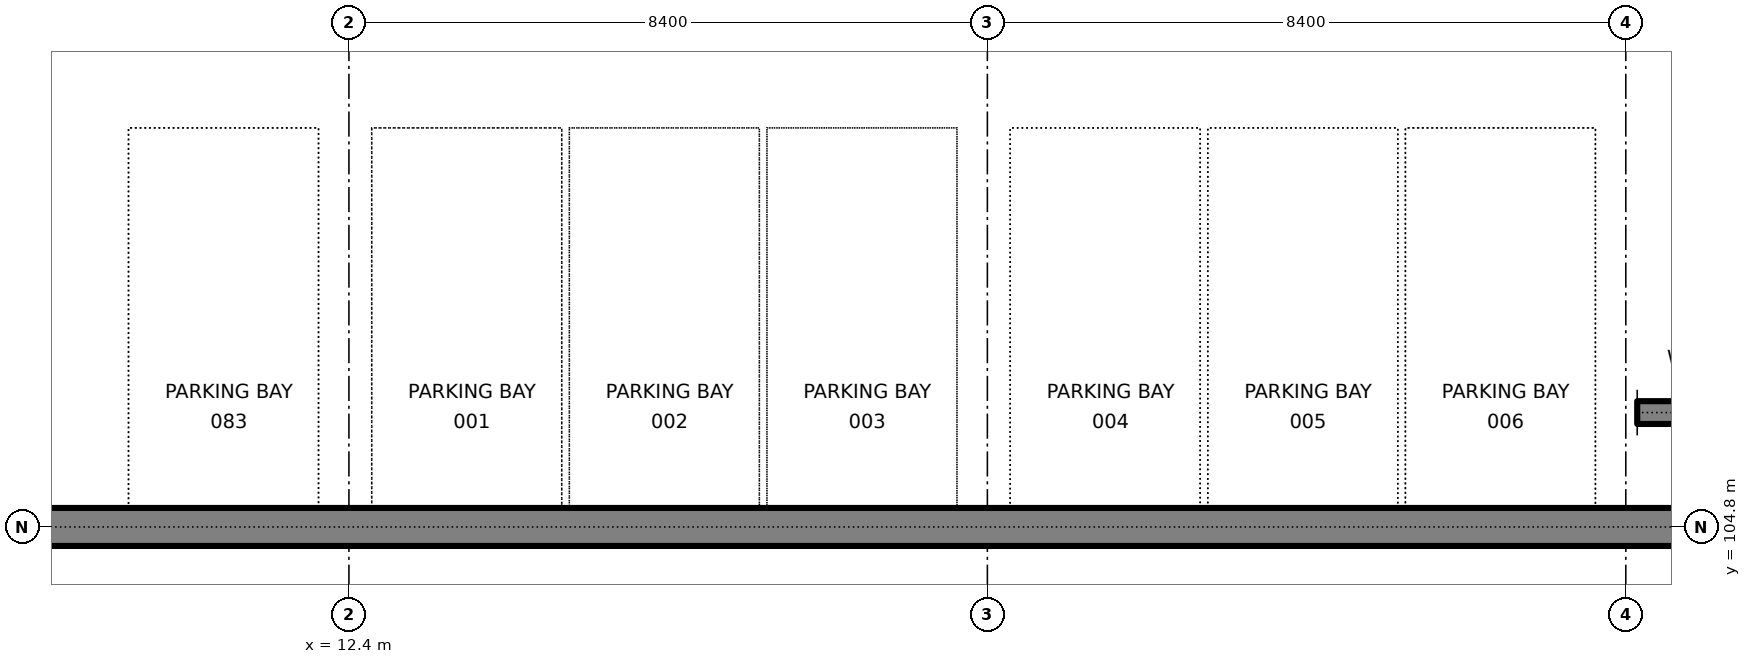
"""IFC4 building model, lengths in metres.
Left out: names, types, materials, properties, quantities, classifications, styles, units other than length and angle.
Written with IfcOpenShell. Run it as: python <this file> out.ifc"""

import sys

from ifc_helpers import new_model, si_unit, direction, frame, frame_2d, origin, place, context, subcontext, project, spatial, rectangle, extrude, element, save


model = new_model("IFC4")
c1 = context("Model", 3, precision=1e-05, world=origin(), true_north=direction((0.0, 1.0)))
c2 = subcontext(c1, "Body", "Model", "MODEL_VIEW")
j1 = project(units=[si_unit("LENGTHUNIT", "METRE"), si_unit("PLANEANGLEUNIT", "RADIAN")], contexts=[c1])
p1 = place(None, origin())
s1 = spatial("IfcSite", under=j1, at=p1, CompositionType="ELEMENT")
p2 = place(p1, origin())
s2 = spatial("IfcBuilding", under=s1, at=p2, CompositionType="ELEMENT")
p3 = place(p2, frame((0.0, 0.0, -4.6)))
s3 = spatial("IfcBuildingStorey", under=s2, at=p3, CompositionType="ELEMENT", Elevation=-4.6)
p4 = place(p3, frame((4.25, 104.8, 0.0), z_axis=(0.0, 0.0, 1.0), x_axis=(1.0, 0.0, 0.0)))
e1 = element("IfcWall", 1, at=p4, inside=s3, PredefinedType="SOLIDWALL", context=c2, shape_type="SweptSolid", body=[
    extrude(rectangle(XDim=117.1, YDim=0.5, at=frame_2d((58.55, 0.0))), origin(), (0.0, 0.0, 1.0), 4.3),
])
p5 = place(p3, frame((29.35, 106.305, 0.0), z_axis=(0.0, 0.0, 1.0), x_axis=(1.0, 0.0, 0.0)))
e2 = element("IfcWall", 2, at=p5, inside=s3, PredefinedType="SOLIDWALL", context=c2, shape_type="SweptSolid", body=[
    extrude(rectangle(XDim=3.225, YDim=0.3, at=frame_2d((1.612, 0.0))), origin(), (0.0, 0.0, 1.0), 4.3),
])
save(model, sys.argv[1])
